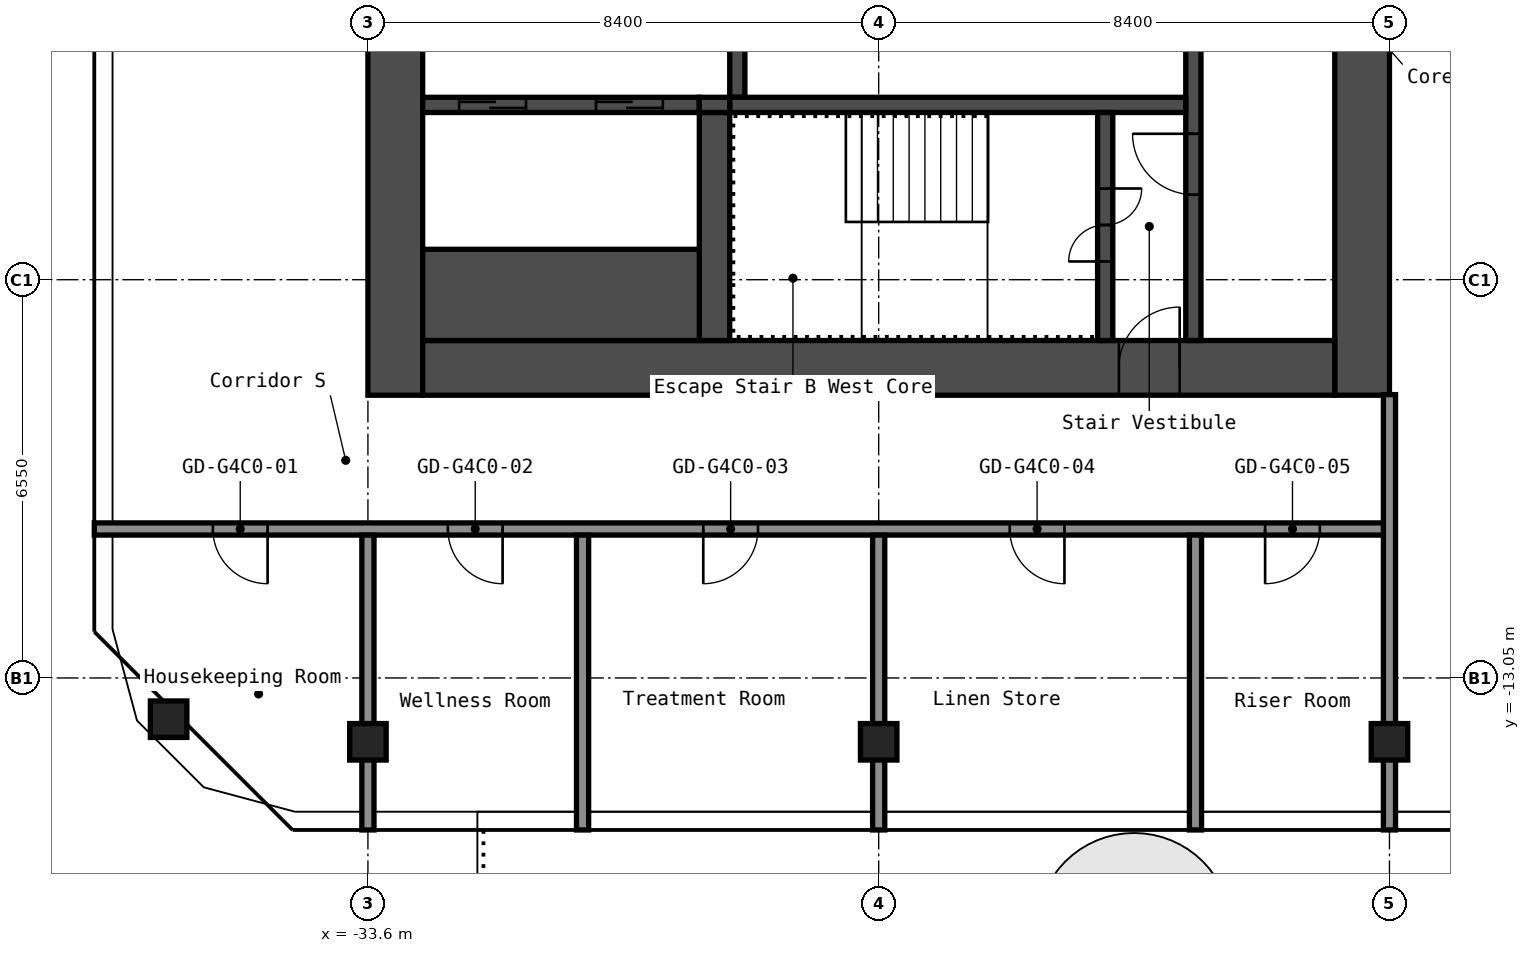
"""IFC4 building model, lengths in metres.
Left out: names, types, materials, properties, quantities, classifications, styles, units other than length and angle.
Written with IfcOpenShell. Run it as: python <this file> out.ifc"""

import sys

from ifc_helpers import new_model, si_unit, direction, frame, frame_2d, origin, origin_2d, place, context, subcontext, project, spatial, rectangle, hollow_rectangle, extrude, element, fill, save


model = new_model("IFC4")
c1 = context("Model", 3, precision=1e-05, world=origin(), true_north=direction((0.0, 1.0)))
c2 = subcontext(c1, "Body", "Model", "MODEL_VIEW")
j1 = project(units=[si_unit("LENGTHUNIT", "METRE"), si_unit("PLANEANGLEUNIT", "RADIAN")], contexts=[c1])
p1 = place(None, origin())
s1 = spatial("IfcSite", under=j1, at=p1, CompositionType="ELEMENT")
p2 = place(p1, origin())
s2 = spatial("IfcBuilding", under=s1, at=p2, CompositionType="ELEMENT")
p3 = place(p2, frame((0.0, 0.0, 193.0)))
s3 = spatial("IfcBuildingStorey", under=s2, at=p3, CompositionType="ELEMENT", Elevation=193.0)
for number, where, z_axis, x_axis in (
    (1, (-36.878, -13.729, 0.0), (0.0, 0.0, 1.0), (1.0, 0.0, 0.0)),
    (2, (-33.6, -14.1, 0.0), (0.0, 0.0, 1.0), (1.0, 0.0, 0.0)),
    (3, (-25.2, -14.1, 0.0), (0.0, 0.0, 1.0), (1.0, 0.0, 0.0)),
    (4, (-16.8, -14.1, 0.0), (0.0, 0.0, 1.0), (1.0, 0.0, 0.0)),
):
    element("IfcColumn", number, at=place(p3, frame(where, z_axis=z_axis, x_axis=x_axis)), inside=s3, PredefinedType="COLUMN", context=c2, shape_type="SweptSolid", body=[
        extrude(hollow_rectangle(XDim=0.6, YDim=0.6, WallThickness=0.025, InnerFilletRadius=0.038, OuterFilletRadius=0.062, at=origin_2d()), origin(), (0.0, 0.0, 1.0), 2.75),
    ])
p4 = place(p3, frame((-17.25, -8.4, 0.0), z_axis=(0.0, 0.0, 1.0), x_axis=(0.0, 1.0, 0.0)))
e5 = element("IfcWall", 5, at=p4, inside=s3, PredefinedType="SHEAR", context=c2, shape_type="SweptSolid", body=[
    extrude(rectangle(XDim=16.8, YDim=0.9, at=frame_2d((8.4, 0.0))), origin(), (0.0, 0.0, 1.0), 2.75),
])
p5 = place(p4, frame((10.1, 0.0, 0.0)))
e6 = element("IfcOpeningElement", 6, at=p5, cuts=e5, PredefinedType="OPENING", context=c2, shape_type="SweptSolid", body=[
    extrude(rectangle(XDim=1.6, YDim=2.1, at=frame_2d((0.8, 1.05))), frame((0.0, 0.46, 0.0), z_axis=(0.0, -1.0, 0.0), x_axis=(1.0, 0.0, 0.0)), (0.0, 0.0, 1.0), 0.92),
])
p6 = place(p3, frame((-33.15, -8.4, 0.0), z_axis=(0.0, 0.0, 1.0), x_axis=(0.0, 1.0, 0.0)))
e7 = element("IfcWall", 7, at=p6, inside=s3, PredefinedType="SHEAR", context=c2, shape_type="SweptSolid", body=[
    extrude(rectangle(XDim=16.8, YDim=0.9, at=frame_2d((8.4, 0.0))), origin(), (0.0, 0.0, 1.0), 2.75),
])
p7 = place(p3, frame((-32.7, -7.95, 0.0), z_axis=(0.0, 0.0, 1.0), x_axis=(1.0, 0.0, 0.0)))
e8 = element("IfcWall", 8, at=p7, inside=s3, PredefinedType="SHEAR", context=c2, shape_type="SweptSolid", body=[
    extrude(rectangle(XDim=15.0, YDim=0.9, at=frame_2d((7.5, 0.0))), origin(), (0.0, 0.0, 1.0), 2.75),
])
p8 = place(p7, frame((11.45, 0.0, 0.0)))
e9 = element("IfcOpeningElement", 9, at=p8, cuts=e8, PredefinedType="OPENING", context=c2, shape_type="SweptSolid", body=[
    extrude(rectangle(XDim=1.0, YDim=2.1, at=frame_2d((0.5, 1.05))), frame((0.0, 0.46, 0.0), z_axis=(0.0, -1.0, 0.0), x_axis=(1.0, 0.0, 0.0)), (0.0, 0.0, 1.0), 0.92),
])
p9 = place(p3, frame((-20.025, -7.5, 0.0), z_axis=(0.0, 0.0, 1.0), x_axis=(0.0, 1.0, 0.0)))
e10 = element("IfcWall", 10, at=p9, inside=s3, PredefinedType="SHEAR", context=c2, shape_type="SweptSolid", body=[
    extrude(rectangle(XDim=6.3, YDim=0.25, at=frame_2d((3.15, 0.0))), origin(), (0.0, 0.0, 1.0), 2.75),
])
p10 = place(p9, frame((2.4, 0.0, 0.0)))
e11 = element("IfcOpeningElement", 11, at=p10, cuts=e10, PredefinedType="OPENING", context=c2, shape_type="SweptSolid", body=[
    extrude(rectangle(XDim=1.0, YDim=2.1, at=frame_2d((0.5, 1.05))), frame((0.0, 0.135, 0.0), z_axis=(0.0, -1.0, 0.0), x_axis=(1.0, 0.0, 0.0)), (0.0, 0.0, 1.0), 0.27),
])
p11 = place(p3, frame((-27.525, -3.5, 0.0), z_axis=(0.0, 0.0, 1.0), x_axis=(0.0, 1.0, 0.0)))
e12 = element("IfcWall", 12, at=p11, inside=s3, PredefinedType="SHEAR", context=c2, shape_type="SweptSolid", body=[
    extrude(rectangle(XDim=2.05, YDim=0.25, at=frame_2d((1.025, 0.0))), origin(), (0.0, 0.0, 1.0), 2.75),
])
p12 = place(p3, frame((-27.65, -3.625, 0.0), z_axis=(0.0, 0.0, 1.0), x_axis=(1.0, 0.0, 0.0)))
e13 = element("IfcWall", 13, at=p12, inside=s3, PredefinedType="SHEAR", context=c2, shape_type="SweptSolid", body=[
    extrude(rectangle(XDim=7.5, YDim=0.25, at=frame_2d((3.75, 0.0))), origin(), (0.0, 0.0, 1.0), 2.75),
])
p13 = place(p3, frame((-21.475, -7.5, 0.0), z_axis=(0.0, 0.0, 1.0), x_axis=(0.0, 1.0, 0.0)))
e14 = element("IfcWall", 14, at=p13, inside=s3, PredefinedType="SHEAR", context=c2, shape_type="SweptSolid", body=[
    extrude(rectangle(XDim=3.75, YDim=0.25, at=frame_2d((1.875, 0.0))), origin(), (0.0, 0.0, 1.0), 2.75),
])
p14 = place(p13, frame((1.3, 0.0, 0.0)))
e15 = element("IfcOpeningElement", 15, at=p14, cuts=e14, PredefinedType="OPENING", context=c2, shape_type="SweptSolid", body=[
    extrude(rectangle(XDim=1.2, YDim=2.1, at=frame_2d((0.6, 1.05))), frame((0.0, 0.135, 0.0), z_axis=(0.0, -1.0, 0.0), x_axis=(1.0, 0.0, 0.0)), (0.0, 0.0, 1.0), 0.27),
])
p15 = place(p3, frame((-27.9, -7.5, 0.0), z_axis=(0.0, 0.0, 1.0), x_axis=(0.0, 1.0, 0.0)))
e16 = element("IfcWall", 16, at=p15, inside=s3, PredefinedType="SHEAR", context=c2, shape_type="SweptSolid", body=[
    extrude(rectangle(XDim=3.75, YDim=0.5, at=frame_2d((1.875, 0.0))), origin(), (0.0, 0.0, 1.0), 2.75),
])
p16 = place(p3, frame((-32.7, -3.625, 0.0), z_axis=(0.0, 0.0, 1.0), x_axis=(1.0, 0.0, 0.0)))
e17 = element("IfcWall", 17, at=p16, inside=s3, PredefinedType="SHEAR", context=c2, shape_type="SweptSolid", body=[
    extrude(rectangle(XDim=4.55, YDim=0.25, at=frame_2d((2.275, 0.0))), origin(), (0.0, 0.0, 1.0), 2.75),
])
p17 = place(p16, frame((2.85, 0.0, 0.0)))
e18 = element("IfcOpeningElement", 18, at=p17, cuts=e17, PredefinedType="OPENING", context=c2, shape_type="SweptSolid", body=[
    extrude(rectangle(XDim=1.1, YDim=2.1, at=frame_2d((0.55, 1.05))), frame((0.0, 0.135, 0.0), z_axis=(0.0, -1.0, 0.0), x_axis=(1.0, 0.0, 0.0)), (0.0, 0.0, 1.0), 0.27),
])
p18 = place(p16, frame((0.6, 0.0, 0.0)))
e19 = element("IfcOpeningElement", 19, at=p18, cuts=e17, PredefinedType="OPENING", context=c2, shape_type="SweptSolid", body=[
    extrude(rectangle(XDim=1.1, YDim=2.1, at=frame_2d((0.55, 1.05))), frame((0.0, 0.135, 0.0), z_axis=(0.0, -1.0, 0.0), x_axis=(1.0, 0.0, 0.0)), (0.0, 0.0, 1.0), 0.27),
])
p19 = place(p3, frame((-32.7, -6.75, 0.0), z_axis=(0.0, 0.0, 1.0), x_axis=(1.0, 0.0, 0.0)))
e20 = element("IfcWall", 20, at=p19, inside=s3, PredefinedType="SHEAR", context=c2, shape_type="SweptSolid", body=[
    extrude(rectangle(XDim=4.55, YDim=1.5, at=frame_2d((2.275, 0.0))), origin(), (0.0, 0.0, 1.0), 2.75),
])
p20 = place(p3, frame((-28.15, -3.625, 0.0), z_axis=(0.0, 0.0, 1.0), x_axis=(1.0, 0.0, 0.0)))
e21 = element("IfcWall", 21, at=p20, inside=s3, PredefinedType="SHEAR", context=c2, shape_type="SweptSolid", body=[
    extrude(rectangle(XDim=0.5, YDim=0.25, at=frame_2d((0.25, 0.0))), origin(), (0.0, 0.0, 1.0), 2.75),
])
p21 = place(p3, frame((-38.1, -10.6, 0.0), z_axis=(0.0, 0.0, 1.0), x_axis=(1.0, 0.0, 0.0)))
e22 = element("IfcWall", 22, at=p21, inside=s3, PredefinedType="PARTITIONING", context=c2, shape_type="SweptSolid", body=[
    extrude(rectangle(XDim=21.3, YDim=0.2, at=frame_2d((10.65, 0.0))), origin(), (0.0, 0.0, 1.0), 2.75),
])
p22 = place(p21, frame((1.95, 0.0, 0.0)))
e23 = element("IfcOpeningElement", 23, at=p22, cuts=e22, PredefinedType="OPENING", context=c2, shape_type="SweptSolid", body=[
    extrude(rectangle(XDim=0.9, YDim=2.1, at=frame_2d((0.45, 1.05))), frame((0.0, 0.11, 0.0), z_axis=(0.0, -1.0, 0.0), x_axis=(1.0, 0.0, 0.0)), (0.0, 0.0, 1.0), 0.22),
])
p23 = place(p21, frame((5.815, 0.0, 0.0)))
e24 = element("IfcOpeningElement", 24, at=p23, cuts=e22, PredefinedType="OPENING", context=c2, shape_type="SweptSolid", body=[
    extrude(rectangle(XDim=0.9, YDim=2.1, at=frame_2d((0.45, 1.05))), frame((0.0, 0.11, 0.0), z_axis=(0.0, -1.0, 0.0), x_axis=(1.0, 0.0, 0.0)), (0.0, 0.0, 1.0), 0.22),
])
p24 = place(p21, frame((10.015, 0.0, 0.0)))
e25 = element("IfcOpeningElement", 25, at=p24, cuts=e22, PredefinedType="OPENING", context=c2, shape_type="SweptSolid", body=[
    extrude(rectangle(XDim=0.9, YDim=2.1, at=frame_2d((0.45, 1.05))), frame((0.0, 0.11, 0.0), z_axis=(0.0, -1.0, 0.0), x_axis=(1.0, 0.0, 0.0)), (0.0, 0.0, 1.0), 0.22),
])
p25 = place(p21, frame((15.055, 0.0, 0.0)))
e26 = element("IfcOpeningElement", 26, at=p25, cuts=e22, PredefinedType="OPENING", context=c2, shape_type="SweptSolid", body=[
    extrude(rectangle(XDim=0.9, YDim=2.1, at=frame_2d((0.45, 1.05))), frame((0.0, 0.11, 0.0), z_axis=(0.0, -1.0, 0.0), x_axis=(1.0, 0.0, 0.0)), (0.0, 0.0, 1.0), 0.22),
])
p26 = place(p21, frame((19.255, 0.0, 0.0)))
e27 = element("IfcOpeningElement", 27, at=p26, cuts=e22, PredefinedType="OPENING", context=c2, shape_type="SweptSolid", body=[
    extrude(rectangle(XDim=0.9, YDim=2.1, at=frame_2d((0.45, 1.05))), frame((0.0, 0.11, 0.0), z_axis=(0.0, -1.0, 0.0), x_axis=(1.0, 0.0, 0.0)), (0.0, 0.0, 1.0), 0.22),
])
for number, where, z_axis, x_axis in (
    (28, (-33.6, -15.55, 0.0), (0.0, 0.0, 1.0), (0.0, 1.0, 0.0)),
    (29, (-30.07, -15.55, 0.0), (0.0, 0.0, 1.0), (0.0, 1.0, 0.0)),
    (30, (-25.2, -15.55, 0.0), (0.0, 0.0, 1.0), (0.0, 1.0, 0.0)),
    (31, (-19.99, -15.55, 0.0), (0.0, 0.0, 1.0), (0.0, 1.0, 0.0)),
):
    element("IfcWall", number, at=place(p3, frame(where, z_axis=z_axis, x_axis=x_axis)), inside=s3, PredefinedType="PARTITIONING", context=c2, shape_type="SweptSolid", body=[
        extrude(rectangle(XDim=4.85, YDim=0.2, at=frame_2d((2.425, 0.0))), origin(), (0.0, 0.0, 1.0), 2.75),
    ])
p27 = place(p3, frame((-16.8, -15.55, 0.0), z_axis=(0.0, 0.0, 1.0), x_axis=(0.0, 1.0, 0.0)))
e32 = element("IfcWall", 32, at=p27, inside=s3, PredefinedType="PARTITIONING", context=c2, shape_type="SweptSolid", body=[
    extrude(rectangle(XDim=7.16, YDim=0.2, at=frame_2d((3.58, 0.0))), origin(), (0.0, 0.0, 1.0), 2.75),
])
p28 = place(p8, origin())
e33 = element("IfcDoor", 33, at=p28, inside=s3, OperationType="SINGLE_SWING_LEFT", PredefinedType="DOOR", context=c2, shape_type="SweptSolid", body=[
    extrude(rectangle(XDim=1.0, YDim=2.1, at=frame_2d((0.5, 1.05))), frame((0.0, 0.025, 0.0), z_axis=(0.0, -1.0, 0.0), x_axis=(1.0, 0.0, 0.0)), (0.0, 0.0, 1.0), 0.05),
])
fill(e9, e33)
p29 = place(p14, origin())
e34 = element("IfcDoor", 34, at=p29, inside=s3, OperationType="DOUBLE_DOOR_SINGLE_SWING", PredefinedType="DOOR", context=c2, shape_type="SweptSolid", body=[
    extrude(rectangle(XDim=1.2, YDim=2.1, at=frame_2d((0.6, 1.05))), frame((0.0, 0.025, 0.0), z_axis=(0.0, -1.0, 0.0), x_axis=(1.0, 0.0, 0.0)), (0.0, 0.0, 1.0), 0.05),
])
fill(e15, e34)
p30 = place(p10, origin())
e35 = element("IfcDoor", 35, at=p30, inside=s3, OperationType="SINGLE_SWING_LEFT", PredefinedType="DOOR", context=c2, shape_type="SweptSolid", body=[
    extrude(rectangle(XDim=1.0, YDim=2.1, at=frame_2d((0.5, 1.05))), frame((0.0, 0.025, 0.0), z_axis=(0.0, -1.0, 0.0), x_axis=(1.0, 0.0, 0.0)), (0.0, 0.0, 1.0), 0.05),
])
fill(e11, e35)
p31 = place(p17, origin())
e36 = element("IfcDoor", 36, at=p31, inside=s3, OperationType="DOUBLE_DOOR_SLIDING", PredefinedType="DOOR", context=c2, shape_type="SweptSolid", body=[
    extrude(rectangle(XDim=1.1, YDim=2.1, at=frame_2d((0.55, 1.05))), frame((0.0, 0.025, 0.0), z_axis=(0.0, -1.0, 0.0), x_axis=(1.0, 0.0, 0.0)), (0.0, 0.0, 1.0), 0.05),
])
fill(e18, e36)
p32 = place(p18, origin())
e37 = element("IfcDoor", 37, at=p32, inside=s3, OperationType="DOUBLE_DOOR_SLIDING", PredefinedType="DOOR", context=c2, shape_type="SweptSolid", body=[
    extrude(rectangle(XDim=1.1, YDim=2.1, at=frame_2d((0.55, 1.05))), frame((0.0, 0.025, 0.0), z_axis=(0.0, -1.0, 0.0), x_axis=(1.0, 0.0, 0.0)), (0.0, 0.0, 1.0), 0.05),
])
fill(e19, e37)
p33 = place(p22, origin())
e38 = element("IfcDoor", 38, at=p33, inside=s3, OperationType="SINGLE_SWING_RIGHT", PredefinedType="DOOR", context=c2, shape_type="SweptSolid", body=[
    extrude(rectangle(XDim=0.9, YDim=2.1, at=frame_2d((0.45, 1.05))), frame((0.0, 0.025, 0.0), z_axis=(0.0, -1.0, 0.0), x_axis=(1.0, 0.0, 0.0)), (0.0, 0.0, 1.0), 0.05),
])
fill(e23, e38)
p34 = place(p23, origin())
e39 = element("IfcDoor", 39, at=p34, inside=s3, OperationType="SINGLE_SWING_RIGHT", PredefinedType="DOOR", context=c2, shape_type="SweptSolid", body=[
    extrude(rectangle(XDim=0.9, YDim=2.1, at=frame_2d((0.45, 1.05))), frame((0.0, 0.025, 0.0), z_axis=(0.0, -1.0, 0.0), x_axis=(1.0, 0.0, 0.0)), (0.0, 0.0, 1.0), 0.05),
])
fill(e24, e39)
p35 = place(p24, origin())
e40 = element("IfcDoor", 40, at=p35, inside=s3, OperationType="SINGLE_SWING_LEFT", PredefinedType="DOOR", context=c2, shape_type="SweptSolid", body=[
    extrude(rectangle(XDim=0.9, YDim=2.1, at=frame_2d((0.45, 1.05))), frame((0.0, 0.025, 0.0), z_axis=(0.0, -1.0, 0.0), x_axis=(1.0, 0.0, 0.0)), (0.0, 0.0, 1.0), 0.05),
])
fill(e25, e40)
p36 = place(p25, origin())
e41 = element("IfcDoor", 41, at=p36, inside=s3, OperationType="SINGLE_SWING_RIGHT", PredefinedType="DOOR", context=c2, shape_type="SweptSolid", body=[
    extrude(rectangle(XDim=0.9, YDim=2.1, at=frame_2d((0.45, 1.05))), frame((0.0, 0.025, 0.0), z_axis=(0.0, -1.0, 0.0), x_axis=(1.0, 0.0, 0.0)), (0.0, 0.0, 1.0), 0.05),
])
fill(e26, e41)
p37 = place(p26, origin())
e42 = element("IfcDoor", 42, at=p37, inside=s3, OperationType="SINGLE_SWING_LEFT", PredefinedType="DOOR", context=c2, shape_type="SweptSolid", body=[
    extrude(rectangle(XDim=0.9, YDim=2.1, at=frame_2d((0.45, 1.05))), frame((0.0, 0.025, 0.0), z_axis=(0.0, -1.0, 0.0), x_axis=(1.0, 0.0, 0.0)), (0.0, 0.0, 1.0), 0.05),
])
fill(e27, e42)
save(model, sys.argv[1])
